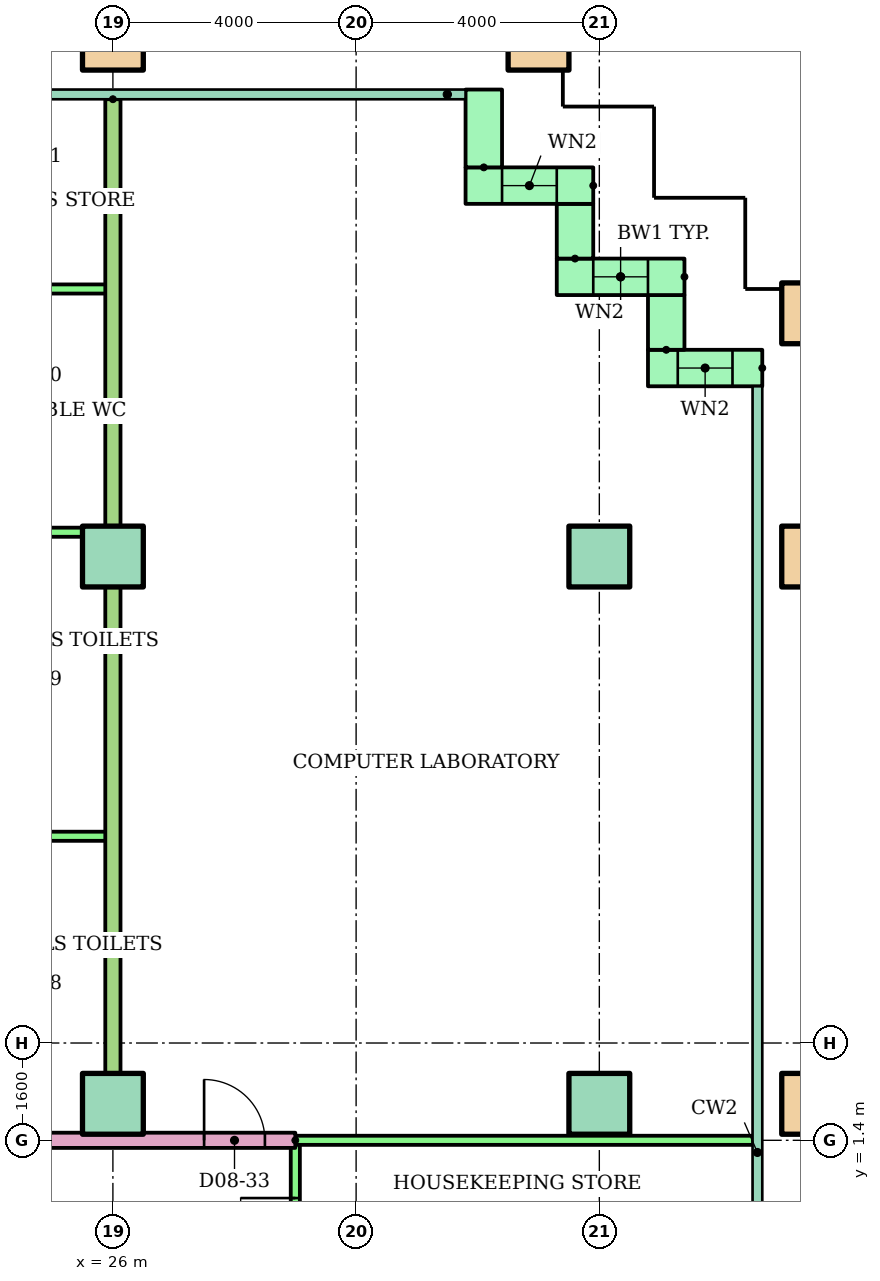
"""IFC4 building model, lengths in metres.
Left out: names, types, materials, properties, quantities, classifications, styles, units other than length and angle.
Written with IfcOpenShell. Run it as: python <this file> out.ifc"""

import sys

from ifc_helpers import new_model, si_unit, direction, frame, frame_2d, origin, origin_2d, place, context, subcontext, project, spatial, rectangle, hollow_rectangle, extrude, element, fill, save


model = new_model("IFC4")
c1 = context("Model", 3, precision=1e-05, world=origin(), true_north=direction((0.0, 1.0)))
c2 = subcontext(c1, "Body", "Model", "MODEL_VIEW")
j1 = project(units=[si_unit("LENGTHUNIT", "METRE"), si_unit("PLANEANGLEUNIT", "RADIAN")], contexts=[c1])
p1 = place(None, origin())
s1 = spatial("IfcSite", under=j1, at=p1, CompositionType="ELEMENT")
p2 = place(p1, origin())
s2 = spatial("IfcBuilding", under=s1, at=p2, CompositionType="ELEMENT")
p3 = place(p2, frame((0.0, 0.0, 33.8)))
s3 = spatial("IfcBuildingStorey", under=s2, at=p3, CompositionType="ELEMENT", Elevation=33.8)
for number, where in (
    (1, (26.0, 2.0, 0.0)),
    (2, (34.0, 2.0, 0.0)),
):
    element("IfcColumn", number, at=place(p3, frame(where)), inside=s3, PredefinedType="COLUMN", context=c2, shape_type="SweptSolid", body=[
        extrude(rectangle(XDim=1.0, YDim=1.0, at=origin_2d()), origin(), (0.0, 0.0, 1.0), 3.9),
    ])
p4 = place(p3, frame((37.5, 2.0, 0.0)))
e3 = element("IfcColumn", 3, at=p4, inside=s3, PredefinedType="COLUMN", context=c2, shape_type="SweptSolid", body=[
    extrude(hollow_rectangle(XDim=1.0, YDim=1.0, WallThickness=0.05, at=origin_2d()), origin(), (0.0, 0.0, 1.0), 3.9),
])
for number, where in (
    (4, (26.0, 11.0, 0.0)),
    (5, (34.0, 11.0, 0.0)),
):
    element("IfcColumn", number, at=place(p3, frame(where)), inside=s3, PredefinedType="COLUMN", context=c2, shape_type="SweptSolid", body=[
        extrude(rectangle(XDim=1.0, YDim=1.0, at=origin_2d()), origin(), (0.0, 0.0, 1.0), 3.9),
    ])
for number, where in (
    (6, (37.5, 11.0, 0.0)),
    (7, (37.5, 15.0, 0.0)),
    (8, (26.0, 19.5, 0.0)),
    (9, (33.0, 19.5, 0.0)),
):
    element("IfcColumn", number, at=place(p3, frame(where)), inside=s3, PredefinedType="COLUMN", context=c2, shape_type="SweptSolid", body=[
        extrude(hollow_rectangle(XDim=1.0, YDim=1.0, WallThickness=0.05, at=origin_2d()), origin(), (0.0, 0.0, 1.0), 3.9),
    ])
p5 = place(p3, frame((36.68, 14.1, 0.0), z_axis=(0.0, 0.0, 1.0), x_axis=(-1.0, 0.0, 0.0)))
e10 = element("IfcWall", 10, at=p5, inside=s3, PredefinedType="STANDARD", context=c2, shape_type="SweptSolid", body=[
    extrude(rectangle(XDim=1.88, YDim=0.6, at=frame_2d((0.94, 0.0))), origin(), (0.0, 0.0, 1.0), 3.6),
])
p6 = place(p5, frame((0.49, 0.0, 0.9)))
e11 = element("IfcOpeningElement", 11, at=p6, cuts=e10, PredefinedType="OPENING", context=c2, shape_type="SweptSolid", body=[
    extrude(rectangle(XDim=0.9, YDim=1.8, at=frame_2d((0.45, 0.9))), frame((0.0, 0.31, 0.0), z_axis=(0.0, -1.0, 0.0), x_axis=(1.0, 0.0, 0.0)), (0.0, 0.0, 1.0), 0.62),
])
p7 = place(p3, frame((35.1, 14.4, 0.0), z_axis=(0.0, 0.0, 1.0), x_axis=(0.0, 1.0, 0.0)))
e12 = element("IfcWall", 12, at=p7, inside=s3, PredefinedType="STANDARD", context=c2, shape_type="SweptSolid", body=[
    extrude(rectangle(XDim=0.9, YDim=0.6, at=frame_2d((0.45, 0.0))), origin(), (0.0, 0.0, 1.0), 3.6),
])
p8 = place(p3, frame((35.4, 15.6, 0.0), z_axis=(0.0, 0.0, 1.0), x_axis=(-1.0, 0.0, 0.0)))
e13 = element("IfcWall", 13, at=p8, inside=s3, PredefinedType="STANDARD", context=c2, shape_type="SweptSolid", body=[
    extrude(rectangle(XDim=2.1, YDim=0.6, at=frame_2d((1.05, 0.0))), origin(), (0.0, 0.0, 1.0), 3.6),
])
p9 = place(p8, frame((0.6, 0.0, 0.9)))
e14 = element("IfcOpeningElement", 14, at=p9, cuts=e13, PredefinedType="OPENING", context=c2, shape_type="SweptSolid", body=[
    extrude(rectangle(XDim=0.9, YDim=1.8, at=frame_2d((0.45, 0.9))), frame((0.0, 0.31, 0.0), z_axis=(0.0, -1.0, 0.0), x_axis=(1.0, 0.0, 0.0)), (0.0, 0.0, 1.0), 0.62),
])
p10 = place(p3, frame((33.6, 15.9, 0.0), z_axis=(0.0, 0.0, 1.0), x_axis=(0.0, 1.0, 0.0)))
e15 = element("IfcWall", 15, at=p10, inside=s3, PredefinedType="STANDARD", context=c2, shape_type="SweptSolid", body=[
    extrude(rectangle(XDim=0.9, YDim=0.6, at=frame_2d((0.45, 0.0))), origin(), (0.0, 0.0, 1.0), 3.6),
])
p11 = place(p3, frame((33.9, 17.1, 0.0), z_axis=(0.0, 0.0, 1.0), x_axis=(-1.0, 0.0, 0.0)))
e16 = element("IfcWall", 16, at=p11, inside=s3, PredefinedType="STANDARD", context=c2, shape_type="SweptSolid", body=[
    extrude(rectangle(XDim=2.1, YDim=0.6, at=frame_2d((1.05, 0.0))), origin(), (0.0, 0.0, 1.0), 3.6),
])
p12 = place(p11, frame((0.6, 0.0, 0.9)))
e17 = element("IfcOpeningElement", 17, at=p12, cuts=e16, PredefinedType="OPENING", context=c2, shape_type="SweptSolid", body=[
    extrude(rectangle(XDim=0.9, YDim=1.8, at=frame_2d((0.45, 0.9))), frame((0.0, 0.31, 0.0), z_axis=(0.0, -1.0, 0.0), x_axis=(1.0, 0.0, 0.0)), (0.0, 0.0, 1.0), 0.62),
])
p13 = place(p3, frame((32.1, 17.4, 0.0), z_axis=(0.0, 0.0, 1.0), x_axis=(0.0, 1.0, 0.0)))
e18 = element("IfcWall", 18, at=p13, inside=s3, PredefinedType="STANDARD", context=c2, shape_type="SweptSolid", body=[
    extrude(rectangle(XDim=1.28, YDim=0.6, at=frame_2d((0.64, 0.0))), origin(), (0.0, 0.0, 1.0), 3.6),
])
p14 = place(p3, frame((29.0, -1.4, 0.0), z_axis=(0.0, 0.0, 1.0), x_axis=(0.0, 1.0, 0.0)))
e19 = element("IfcWall", 19, at=p14, inside=s3, PredefinedType="PARTITIONING", context=c2, shape_type="SweptSolid", body=[
    extrude(rectangle(XDim=2.8, YDim=0.15, at=frame_2d((1.4, 0.0))), origin(), (0.0, 0.0, 1.0), 3.1),
])
p15 = place(p14, frame((0.95, 0.0, 0.0)))
e20 = element("IfcOpeningElement", 20, at=p15, cuts=e19, PredefinedType="OPENING", context=c2, shape_type="SweptSolid", body=[
    extrude(rectangle(XDim=0.9, YDim=2.1, at=frame_2d((0.45, 1.05))), frame((0.0, 0.085, 0.0), z_axis=(0.0, -1.0, 0.0), x_axis=(1.0, 0.0, 0.0)), (0.0, 0.0, 1.0), 0.17),
])
p16 = place(p3, frame((14.0, 1.4, 0.0)))
e21 = element("IfcWall", 21, at=p16, inside=s3, PredefinedType="PARTITIONING", context=c2, shape_type="SweptSolid", body=[
    extrude(rectangle(XDim=15.0, YDim=0.25, at=frame_2d((7.5, 0.0))), origin(), (0.0, 0.0, 1.0), 3.1),
])
p17 = place(p16, frame((1.5, 0.0, 0.0)))
e22 = element("IfcOpeningElement", 22, at=p17, cuts=e21, PredefinedType="OPENING", context=c2, shape_type="SweptSolid", body=[
    extrude(rectangle(XDim=1.0, YDim=2.1, at=frame_2d((0.5, 1.05))), frame((0.0, 0.135, 0.0), z_axis=(0.0, -1.0, 0.0), x_axis=(1.0, 0.0, 0.0)), (0.0, 0.0, 1.0), 0.27),
])
p18 = place(p16, frame((8.3, 0.0, 0.0)))
e23 = element("IfcOpeningElement", 23, at=p18, cuts=e21, PredefinedType="OPENING", context=c2, shape_type="SweptSolid", body=[
    extrude(rectangle(XDim=1.0, YDim=2.1, at=frame_2d((0.5, 1.05))), frame((0.0, 0.135, 0.0), z_axis=(0.0, -1.0, 0.0), x_axis=(1.0, 0.0, 0.0)), (0.0, 0.0, 1.0), 0.27),
])
p19 = place(p16, frame((13.5, 0.0, 0.0)))
e24 = element("IfcOpeningElement", 24, at=p19, cuts=e21, PredefinedType="OPENING", context=c2, shape_type="SweptSolid", body=[
    extrude(rectangle(XDim=1.0, YDim=2.1, at=frame_2d((0.5, 1.05))), frame((0.0, 0.135, 0.0), z_axis=(0.0, -1.0, 0.0), x_axis=(1.0, 0.0, 0.0)), (0.0, 0.0, 1.0), 0.27),
])
p20 = place(p3, frame((29.0, 1.4, 0.0)))
e25 = element("IfcWall", 25, at=p20, inside=s3, PredefinedType="PARTITIONING", context=c2, shape_type="SweptSolid", body=[
    extrude(rectangle(XDim=7.53, YDim=0.15, at=frame_2d((3.765, 0.0))), origin(), (0.0, 0.0, 1.0), 3.1),
])
for number, where in (
    (26, (23.6, 6.4, 0.0)),
    (27, (23.6, 11.4, 0.0)),
    (28, (23.6, 15.4, 0.0)),
):
    element("IfcWall", number, at=place(p3, frame(where)), inside=s3, PredefinedType="PARTITIONING", context=c2, shape_type="SweptSolid", body=[
        extrude(rectangle(XDim=2.4, YDim=0.15, at=frame_2d((1.2, 0.0))), origin(), (0.0, 0.0, 1.0), 3.1),
    ])
p21 = place(p3, frame((26.0, 18.521, 0.0), z_axis=(0.0, 0.0, 1.0), x_axis=(0.0, -1.0, 0.0)))
e29 = element("IfcWall", 29, at=p21, inside=s3, PredefinedType="PARTITIONING", context=c2, shape_type="SweptSolid", body=[
    extrude(rectangle(XDim=17.121, YDim=0.25, at=frame_2d((8.561, 0.0))), origin(), (0.0, 0.0, 1.0), 3.1),
])
p22 = place(p6, origin())
e30 = element("IfcWindow", 30, at=p22, inside=s3, PartitioningType="SINGLE_PANEL", PredefinedType="WINDOW", context=c2, shape_type="SweptSolid", body=[
    extrude(rectangle(XDim=0.9, YDim=1.8, at=frame_2d((0.45, 0.9))), frame((0.0, 0.03, 0.0), z_axis=(0.0, -1.0, 0.0), x_axis=(1.0, 0.0, 0.0)), (0.0, 0.0, 1.0), 0.06),
])
fill(e11, e30)
p23 = place(p9, origin())
e31 = element("IfcWindow", 31, at=p23, inside=s3, PartitioningType="SINGLE_PANEL", PredefinedType="WINDOW", context=c2, shape_type="SweptSolid", body=[
    extrude(rectangle(XDim=0.9, YDim=1.8, at=frame_2d((0.45, 0.9))), frame((0.0, 0.03, 0.0), z_axis=(0.0, -1.0, 0.0), x_axis=(1.0, 0.0, 0.0)), (0.0, 0.0, 1.0), 0.06),
])
fill(e14, e31)
p24 = place(p12, origin())
e32 = element("IfcWindow", 32, at=p24, inside=s3, PartitioningType="SINGLE_PANEL", PredefinedType="WINDOW", context=c2, shape_type="SweptSolid", body=[
    extrude(rectangle(XDim=0.9, YDim=1.8, at=frame_2d((0.45, 0.9))), frame((0.0, 0.03, 0.0), z_axis=(0.0, -1.0, 0.0), x_axis=(1.0, 0.0, 0.0)), (0.0, 0.0, 1.0), 0.06),
])
fill(e17, e32)
p25 = place(p15, origin())
e33 = element("IfcDoor", 33, at=p25, inside=s3, OperationType="SINGLE_SWING_RIGHT", PredefinedType="DOOR", context=c2, shape_type="SweptSolid", body=[
    extrude(rectangle(XDim=0.9, YDim=2.1, at=frame_2d((0.45, 1.05))), frame((0.0, 0.025, 0.0), z_axis=(0.0, -1.0, 0.0), x_axis=(1.0, 0.0, 0.0)), (0.0, 0.0, 1.0), 0.05),
])
fill(e20, e33)
p26 = place(p19, origin())
e34 = element("IfcDoor", 34, at=p26, inside=s3, OperationType="SINGLE_SWING_LEFT", PredefinedType="DOOR", context=c2, shape_type="SweptSolid", body=[
    extrude(rectangle(XDim=1.0, YDim=2.1, at=frame_2d((0.5, 1.05))), frame((0.0, 0.025, 0.0), z_axis=(0.0, -1.0, 0.0), x_axis=(1.0, 0.0, 0.0)), (0.0, 0.0, 1.0), 0.05),
])
fill(e24, e34)
save(model, sys.argv[1])
